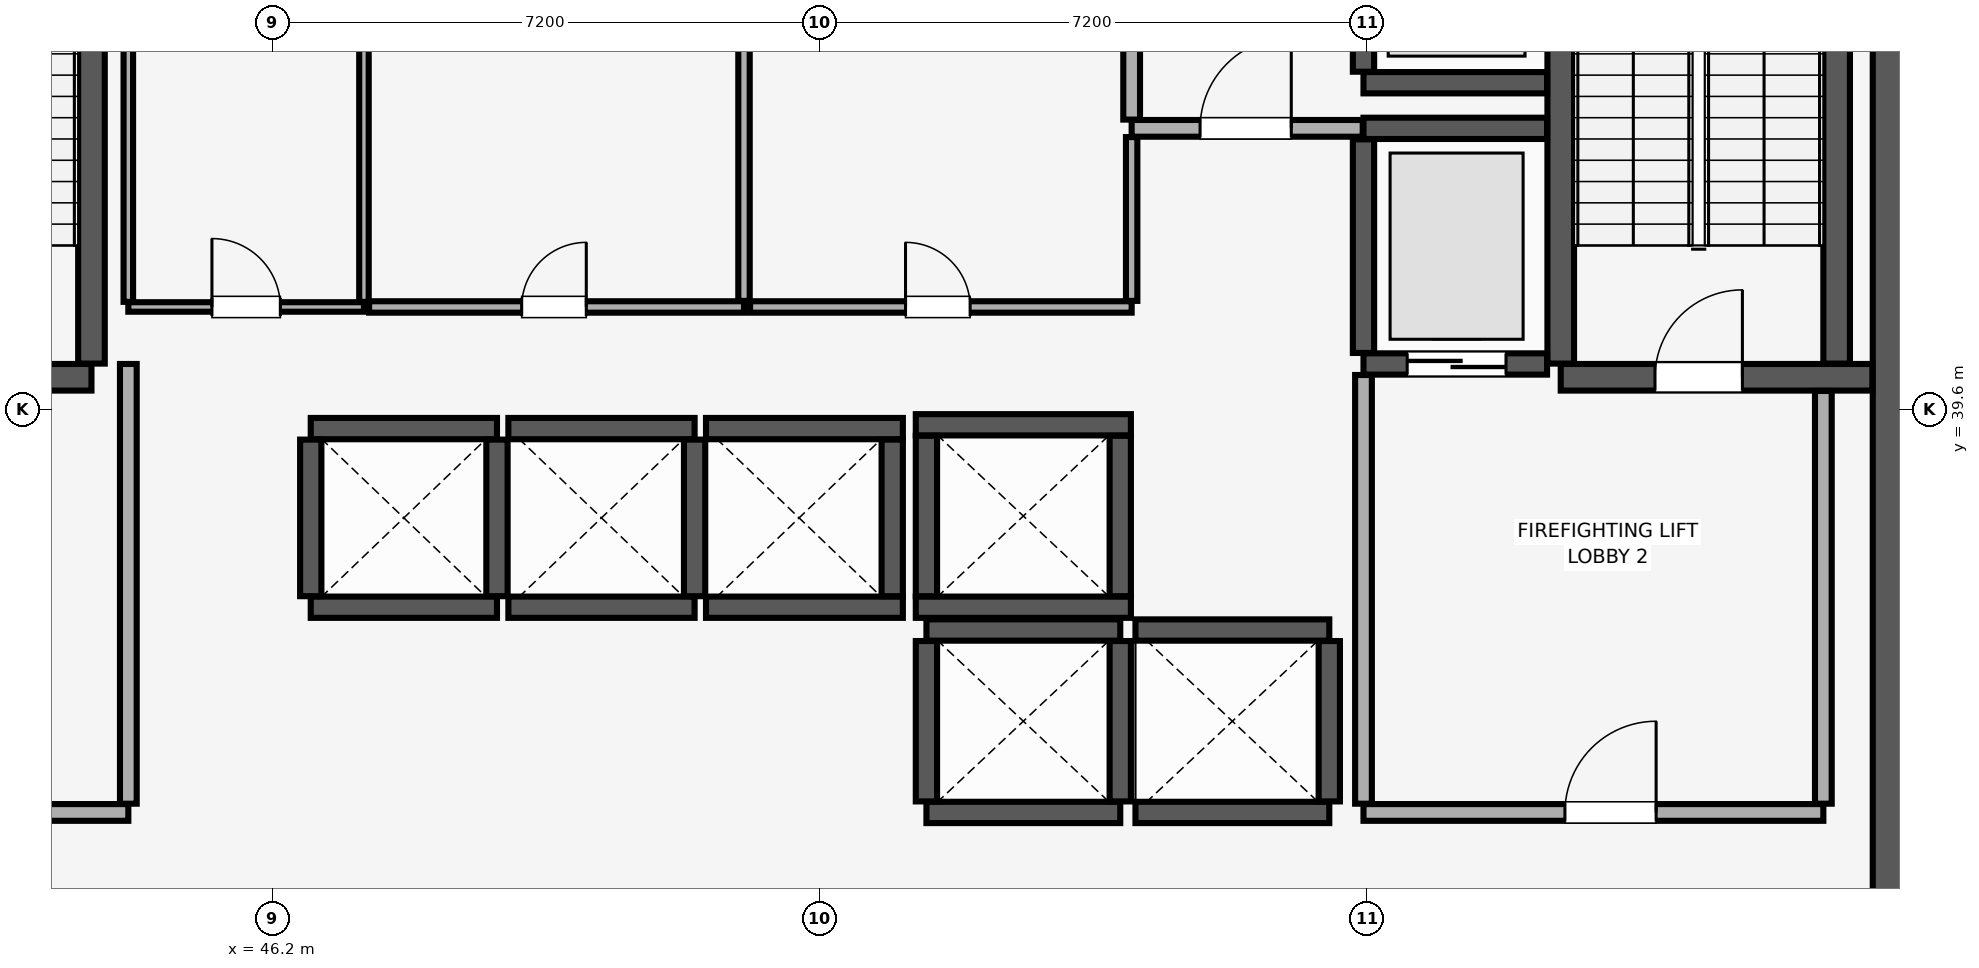
"""IFC4 building model, lengths in metres.
Left out: names, types, materials, properties, quantities, classifications, styles, units other than length and angle.
Written with IfcOpenShell. Run it as: python <this file> out.ifc"""

import sys

from ifc_helpers import new_model, si_unit, direction, frame, frame_2d, origin, place, context, subcontext, project, spatial, rectangle, extrude, element, fill, save


model = new_model("IFC4")
c1 = context("Model", 3, precision=1e-05, world=origin(), true_north=direction((0.0, 1.0)))
c2 = subcontext(c1, "Body", "Model", "MODEL_VIEW")
j1 = project(units=[si_unit("LENGTHUNIT", "METRE"), si_unit("PLANEANGLEUNIT", "RADIAN")], contexts=[c1])
p1 = place(None, origin())
s1 = spatial("IfcSite", under=j1, at=p1, CompositionType="ELEMENT")
p2 = place(p1, origin())
s2 = spatial("IfcBuilding", under=s1, at=p2, CompositionType="ELEMENT")
p3 = place(p2, frame((0.0, 0.0, 35.15)))
s3 = spatial("IfcBuildingStorey", under=s2, at=p3, CompositionType="ELEMENT", Elevation=35.15)
p4 = place(p3, frame((67.8, 29.4, 0.0), z_axis=(0.0, 0.0, 1.0), x_axis=(0.0, 1.0, 0.0)))
e1 = element("IfcWall", 1, at=p4, inside=s3, PredefinedType="SHEAR", context=c2, shape_type="SweptSolid", body=[
    extrude(rectangle(XDim=19.2, YDim=1.1, at=frame_2d((9.6, 0.0))), origin(), (0.0, 0.0, 1.0), 3.51),
])
p5 = place(p3, frame((40.185, 40.025, 0.0), z_axis=(0.0, 0.0, 1.0), x_axis=(1.0, 0.0, 0.0)))
e2 = element("IfcWall", 2, at=p5, inside=s3, PredefinedType="SHEAR", context=c2, shape_type="SweptSolid", body=[
    extrude(rectangle(XDim=3.63, YDim=0.35, at=frame_2d((1.815, 0.0))), origin(), (0.0, 0.0, 1.0), 3.51),
])
p6 = place(p5, frame((1.24, 0.0, 0.0)))
e3 = element("IfcOpeningElement", 3, at=p6, cuts=e2, PredefinedType="OPENING", context=c2, shape_type="SweptSolid", body=[
    extrude(rectangle(XDim=1.15, YDim=2.15, at=frame_2d((0.575, 1.075))), frame((0.0, 0.185, 0.0), z_axis=(0.0, -1.0, 0.0), x_axis=(1.0, 0.0, 0.0)), (0.0, 0.0, 1.0), 0.37),
])
p7 = place(p3, frame((43.815, 40.205, 0.0), z_axis=(0.0, 0.0, 1.0), x_axis=(0.0, 1.0, 0.0)))
e4 = element("IfcWall", 4, at=p7, inside=s3, PredefinedType="SHEAR", context=c2, shape_type="SweptSolid", body=[
    extrude(rectangle(XDim=8.09, YDim=0.35, at=frame_2d((4.045, 0.0))), origin(), (0.0, 0.0, 1.0), 3.51),
])
p8 = place(p3, frame((63.145, 40.025, 0.0), z_axis=(0.0, 0.0, 1.0), x_axis=(1.0, 0.0, 0.0)))
e5 = element("IfcWall", 5, at=p8, inside=s3, PredefinedType="SHEAR", context=c2, shape_type="SweptSolid", body=[
    extrude(rectangle(XDim=4.1, YDim=0.35, at=frame_2d((2.05, 0.0))), origin(), (0.0, 0.0, 1.0), 3.51),
])
p9 = place(p8, frame((1.24, 0.0, 0.0)))
e6 = element("IfcOpeningElement", 6, at=p9, cuts=e5, PredefinedType="OPENING", context=c2, shape_type="SweptSolid", body=[
    extrude(rectangle(XDim=1.15, YDim=2.15, at=frame_2d((0.575, 1.075))), frame((0.0, 0.185, 0.0), z_axis=(0.0, -1.0, 0.0), x_axis=(1.0, 0.0, 0.0)), (0.0, 0.0, 1.0), 0.37),
])
for number, where, z_axis, x_axis in (
    (7, (63.145, 40.205, 0.0), (0.0, 0.0, 1.0), (0.0, 1.0, 0.0)),
    (8, (66.775, 40.205, 0.0), (0.0, 0.0, 1.0), (0.0, 1.0, 0.0)),
):
    element("IfcWall", number, at=place(p3, frame(where, z_axis=z_axis, x_axis=x_axis)), inside=s3, PredefinedType="SHEAR", context=c2, shape_type="SweptSolid", body=[
        extrude(rectangle(XDim=8.09, YDim=0.35, at=frame_2d((4.045, 0.0))), origin(), (0.0, 0.0, 1.0), 3.51),
    ])
for number, where, z_axis, x_axis in (
    (9, (46.7, 37.0, 0.0), (0.0, 0.0, 1.0), (1.0, 0.0, 0.0)),
    (10, (46.7, 39.35, 0.0), (0.0, 0.0, 1.0), (1.0, 0.0, 0.0)),
):
    element("IfcWall", number, at=place(p3, frame(where, z_axis=z_axis, x_axis=x_axis)), inside=s3, PredefinedType="SHEAR", context=c2, shape_type="SweptSolid", body=[
        extrude(rectangle(XDim=2.45, YDim=0.28, at=frame_2d((1.225, 0.0))), origin(), (0.0, 0.0, 1.0), 3.51),
    ])
for number, where, z_axis, x_axis in (
    (11, (46.7, 37.145, 0.0), (0.0, 0.0, 1.0), (0.0, 1.0, 0.0)),
    (12, (49.15, 37.145, 0.0), (0.0, 0.0, 1.0), (0.0, 1.0, 0.0)),
):
    element("IfcWall", number, at=place(p3, frame(where, z_axis=z_axis, x_axis=x_axis)), inside=s3, PredefinedType="SHEAR", context=c2, shape_type="SweptSolid", body=[
        extrude(rectangle(XDim=2.06, YDim=0.28, at=frame_2d((1.03, 0.0))), origin(), (0.0, 0.0, 1.0), 3.51),
    ])
for number, where, z_axis, x_axis in (
    (13, (49.3, 37.0, 0.0), (0.0, 0.0, 1.0), (1.0, 0.0, 0.0)),
    (14, (49.3, 39.35, 0.0), (0.0, 0.0, 1.0), (1.0, 0.0, 0.0)),
):
    element("IfcWall", number, at=place(p3, frame(where, z_axis=z_axis, x_axis=x_axis)), inside=s3, PredefinedType="SHEAR", context=c2, shape_type="SweptSolid", body=[
        extrude(rectangle(XDim=2.45, YDim=0.28, at=frame_2d((1.225, 0.0))), origin(), (0.0, 0.0, 1.0), 3.51),
    ])
p10 = place(p3, frame((51.75, 37.145, 0.0), z_axis=(0.0, 0.0, 1.0), x_axis=(0.0, 1.0, 0.0)))
e15 = element("IfcWall", 15, at=p10, inside=s3, PredefinedType="SHEAR", context=c2, shape_type="SweptSolid", body=[
    extrude(rectangle(XDim=2.06, YDim=0.28, at=frame_2d((1.03, 0.0))), origin(), (0.0, 0.0, 1.0), 3.51),
])
for number, where, z_axis, x_axis in (
    (16, (51.9, 37.0, 0.0), (0.0, 0.0, 1.0), (1.0, 0.0, 0.0)),
    (17, (51.9, 39.35, 0.0), (0.0, 0.0, 1.0), (1.0, 0.0, 0.0)),
):
    element("IfcWall", number, at=place(p3, frame(where, z_axis=z_axis, x_axis=x_axis)), inside=s3, PredefinedType="SHEAR", context=c2, shape_type="SweptSolid", body=[
        extrude(rectangle(XDim=2.59, YDim=0.28, at=frame_2d((1.295, 0.0))), origin(), (0.0, 0.0, 1.0), 3.51),
    ])
p11 = place(p3, frame((54.35, 37.145, 0.0), z_axis=(0.0, 0.0, 1.0), x_axis=(0.0, 1.0, 0.0)))
e18 = element("IfcWall", 18, at=p11, inside=s3, PredefinedType="SHEAR", context=c2, shape_type="SweptSolid", body=[
    extrude(rectangle(XDim=2.06, YDim=0.28, at=frame_2d((1.03, 0.0))), origin(), (0.0, 0.0, 1.0), 3.51),
])
for number, where, z_axis, x_axis in (
    (19, (54.8, 34.3, 0.0), (0.0, 0.0, 1.0), (1.0, 0.0, 0.0)),
    (20, (54.8, 36.7, 0.0), (0.0, 0.0, 1.0), (1.0, 0.0, 0.0)),
):
    element("IfcWall", number, at=place(p3, frame(where, z_axis=z_axis, x_axis=x_axis)), inside=s3, PredefinedType="SHEAR", context=c2, shape_type="SweptSolid", body=[
        extrude(rectangle(XDim=2.55, YDim=0.28, at=frame_2d((1.275, 0.0))), origin(), (0.0, 0.0, 1.0), 3.51),
    ])
for number, where, z_axis, x_axis in (
    (21, (54.8, 34.445, 0.0), (0.0, 0.0, 1.0), (0.0, 1.0, 0.0)),
    (22, (57.35, 34.445, 0.0), (0.0, 0.0, 1.0), (0.0, 1.0, 0.0)),
):
    element("IfcWall", number, at=place(p3, frame(where, z_axis=z_axis, x_axis=x_axis)), inside=s3, PredefinedType="SHEAR", context=c2, shape_type="SweptSolid", body=[
        extrude(rectangle(XDim=2.11, YDim=0.28, at=frame_2d((1.055, 0.0))), origin(), (0.0, 0.0, 1.0), 3.51),
    ])
for number, where, z_axis, x_axis in (
    (23, (57.55, 34.3, 0.0), (0.0, 0.0, 1.0), (1.0, 0.0, 0.0)),
    (24, (57.55, 36.7, 0.0), (0.0, 0.0, 1.0), (1.0, 0.0, 0.0)),
):
    element("IfcWall", number, at=place(p3, frame(where, z_axis=z_axis, x_axis=x_axis)), inside=s3, PredefinedType="SHEAR", context=c2, shape_type="SweptSolid", body=[
        extrude(rectangle(XDim=2.55, YDim=0.28, at=frame_2d((1.275, 0.0))), origin(), (0.0, 0.0, 1.0), 3.51),
    ])
p12 = place(p3, frame((60.1, 34.445, 0.0), z_axis=(0.0, 0.0, 1.0), x_axis=(0.0, 1.0, 0.0)))
e25 = element("IfcWall", 25, at=p12, inside=s3, PredefinedType="SHEAR", context=c2, shape_type="SweptSolid", body=[
    extrude(rectangle(XDim=2.11, YDim=0.28, at=frame_2d((1.055, 0.0))), origin(), (0.0, 0.0, 1.0), 3.51),
])
for number, where, z_axis, x_axis in (
    (26, (54.66, 37.0, 0.0), (0.0, 0.0, 1.0), (1.0, 0.0, 0.0)),
    (27, (54.66, 39.4, 0.0), (0.0, 0.0, 1.0), (1.0, 0.0, 0.0)),
):
    element("IfcWall", number, at=place(p3, frame(where, z_axis=z_axis, x_axis=x_axis)), inside=s3, PredefinedType="SHEAR", context=c2, shape_type="SweptSolid", body=[
        extrude(rectangle(XDim=2.83, YDim=0.28, at=frame_2d((1.415, 0.0))), origin(), (0.0, 0.0, 1.0), 3.51),
    ])
for number, where, z_axis, x_axis in (
    (28, (54.8, 37.145, 0.0), (0.0, 0.0, 1.0), (0.0, 1.0, 0.0)),
    (29, (57.35, 37.145, 0.0), (0.0, 0.0, 1.0), (0.0, 1.0, 0.0)),
):
    element("IfcWall", number, at=place(p3, frame(where, z_axis=z_axis, x_axis=x_axis)), inside=s3, PredefinedType="SHEAR", context=c2, shape_type="SweptSolid", body=[
        extrude(rectangle(XDim=2.11, YDim=0.28, at=frame_2d((1.055, 0.0))), origin(), (0.0, 0.0, 1.0), 3.51),
    ])
p13 = place(p3, frame((60.55, 40.2, 0.0), z_axis=(0.0, 0.0, 1.0), x_axis=(1.0, 0.0, 0.0)))
e30 = element("IfcWall", 30, at=p13, inside=s3, PredefinedType="SHEAR", context=c2, shape_type="SweptSolid", body=[
    extrude(rectangle(XDim=2.415, YDim=0.28, at=frame_2d((1.208, 0.0))), origin(), (0.0, 0.0, 1.0), 3.51),
])
p14 = place(p13, frame((0.575, 0.0, 0.0)))
e31 = element("IfcOpeningElement", 31, at=p14, cuts=e30, PredefinedType="OPENING", context=c2, shape_type="SweptSolid", body=[
    extrude(rectangle(XDim=1.3, YDim=2.3, at=frame_2d((0.65, 1.15))), frame((0.0, 0.15, 0.0), z_axis=(0.0, -1.0, 0.0), x_axis=(1.0, 0.0, 0.0)), (0.0, 0.0, 1.0), 0.3),
])
p15 = place(p3, frame((60.55, 43.3, 0.0), z_axis=(0.0, 0.0, 1.0), x_axis=(1.0, 0.0, 0.0)))
e32 = element("IfcWall", 32, at=p15, inside=s3, PredefinedType="SHEAR", context=c2, shape_type="SweptSolid", body=[
    extrude(rectangle(XDim=2.415, YDim=0.28, at=frame_2d((1.208, 0.0))), origin(), (0.0, 0.0, 1.0), 3.51),
])
p16 = place(p3, frame((60.55, 40.345, 0.0), z_axis=(0.0, 0.0, 1.0), x_axis=(0.0, 1.0, 0.0)))
e33 = element("IfcWall", 33, at=p16, inside=s3, PredefinedType="SHEAR", context=c2, shape_type="SweptSolid", body=[
    extrude(rectangle(XDim=2.81, YDim=0.28, at=frame_2d((1.405, 0.0))), origin(), (0.0, 0.0, 1.0), 3.51),
])
p17 = place(p3, frame((60.55, 43.9, 0.0), z_axis=(0.0, 0.0, 1.0), x_axis=(1.0, 0.0, 0.0)))
e34 = element("IfcWall", 34, at=p17, inside=s3, PredefinedType="SHEAR", context=c2, shape_type="SweptSolid", body=[
    extrude(rectangle(XDim=2.415, YDim=0.28, at=frame_2d((1.208, 0.0))), origin(), (0.0, 0.0, 1.0), 3.51),
])
p18 = place(p3, frame((60.55, 44.045, 0.0), z_axis=(0.0, 0.0, 1.0), x_axis=(0.0, 1.0, 0.0)))
e35 = element("IfcWall", 35, at=p18, inside=s3, PredefinedType="SHEAR", context=c2, shape_type="SweptSolid", body=[
    extrude(rectangle(XDim=3.11, YDim=0.28, at=frame_2d((1.555, 0.0))), origin(), (0.0, 0.0, 1.0), 3.51),
])
p19 = place(p18, frame((0.905, 0.0, 0.0)))
e36 = element("IfcOpeningElement", 36, at=p19, cuts=e35, PredefinedType="OPENING", context=c2, shape_type="SweptSolid", body=[
    extrude(rectangle(XDim=1.3, YDim=2.3, at=frame_2d((0.65, 1.15))), frame((0.0, 0.15, 0.0), z_axis=(0.0, -1.0, 0.0), x_axis=(1.0, 0.0, 0.0)), (0.0, 0.0, 1.0), 0.3),
])
p20 = place(p3, frame((60.55, 34.3, 0.0), z_axis=(0.0, 0.0, 1.0), x_axis=(1.0, 0.0, 0.0)))
e37 = element("IfcWall", 37, at=p20, inside=s3, PredefinedType="PARTITIONING", context=c2, shape_type="SweptSolid", body=[
    extrude(rectangle(XDim=6.05, YDim=0.22, at=frame_2d((3.025, 0.0))), origin(), (0.0, 0.0, 1.0), 3.51),
])
p21 = place(p20, frame((2.65, 0.0, 0.0)))
e38 = element("IfcOpeningElement", 38, at=p21, cuts=e37, PredefinedType="OPENING", context=c2, shape_type="SweptSolid", body=[
    extrude(rectangle(XDim=1.2, YDim=2.15, at=frame_2d((0.6, 1.075))), frame((0.0, 0.12, 0.0), z_axis=(0.0, -1.0, 0.0), x_axis=(1.0, 0.0, 0.0)), (0.0, 0.0, 1.0), 0.24),
])
p22 = place(p3, frame((60.55, 34.415, 0.0), z_axis=(0.0, 0.0, 1.0), x_axis=(0.0, 1.0, 0.0)))
e39 = element("IfcWall", 39, at=p22, inside=s3, PredefinedType="PARTITIONING", context=c2, shape_type="SweptSolid", body=[
    extrude(rectangle(XDim=5.64, YDim=0.22, at=frame_2d((2.82, 0.0))), origin(), (0.0, 0.0, 1.0), 3.51),
])
p23 = place(p3, frame((66.6, 34.415, 0.0), z_axis=(0.0, 0.0, 1.0), x_axis=(0.0, 1.0, 0.0)))
e40 = element("IfcWall", 40, at=p23, inside=s3, PredefinedType="PARTITIONING", context=c2, shape_type="SweptSolid", body=[
    extrude(rectangle(XDim=5.43, YDim=0.22, at=frame_2d((2.715, 0.0))), origin(), (0.0, 0.0, 1.0), 3.51),
])
p24 = place(p3, frame((39.7, 34.3, 0.0), z_axis=(0.0, 0.0, 1.0), x_axis=(1.0, 0.0, 0.0)))
e41 = element("IfcWall", 41, at=p24, inside=s3, PredefinedType="PARTITIONING", context=c2, shape_type="SweptSolid", body=[
    extrude(rectangle(XDim=4.6, YDim=0.22, at=frame_2d((2.3, 0.0))), origin(), (0.0, 0.0, 1.0), 3.51),
])
p25 = place(p24, frame((1.7, 0.0, 0.0)))
e42 = element("IfcOpeningElement", 42, at=p25, cuts=e41, PredefinedType="OPENING", context=c2, shape_type="SweptSolid", body=[
    extrude(rectangle(XDim=1.2, YDim=2.15, at=frame_2d((0.6, 1.075))), frame((0.0, 0.12, 0.0), z_axis=(0.0, -1.0, 0.0), x_axis=(1.0, 0.0, 0.0)), (0.0, 0.0, 1.0), 0.24),
])
p26 = place(p3, frame((44.3, 34.415, 0.0), z_axis=(0.0, 0.0, 1.0), x_axis=(0.0, 1.0, 0.0)))
e43 = element("IfcWall", 43, at=p26, inside=s3, PredefinedType="PARTITIONING", context=c2, shape_type="SweptSolid", body=[
    extrude(rectangle(XDim=5.785, YDim=0.22, at=frame_2d((2.893, 0.0))), origin(), (0.0, 0.0, 1.0), 3.51),
])
p27 = place(p3, frame((57.5, 43.3, 0.0), z_axis=(0.0, 0.0, 1.0), x_axis=(1.0, 0.0, 0.0)))
e44 = element("IfcWall", 44, at=p27, inside=s3, PredefinedType="PARTITIONING", context=c2, shape_type="SweptSolid", body=[
    extrude(rectangle(XDim=3.04, YDim=0.22, at=frame_2d((1.52, 0.0))), origin(), (0.0, 0.0, 1.0), 3.51),
])
p28 = place(p27, frame((0.9, 0.0, 0.0)))
e45 = element("IfcOpeningElement", 45, at=p28, cuts=e44, PredefinedType="OPENING", context=c2, shape_type="SweptSolid", body=[
    extrude(rectangle(XDim=1.2, YDim=2.15, at=frame_2d((0.6, 1.075))), frame((0.0, 0.12, 0.0), z_axis=(0.0, -1.0, 0.0), x_axis=(1.0, 0.0, 0.0)), (0.0, 0.0, 1.0), 0.24),
])
p29 = place(p3, frame((57.5, 43.415, 0.0), z_axis=(0.0, 0.0, 1.0), x_axis=(0.0, 1.0, 0.0)))
e46 = element("IfcWall", 46, at=p29, inside=s3, PredefinedType="PARTITIONING", context=c2, shape_type="SweptSolid", body=[
    extrude(rectangle(XDim=5.435, YDim=0.22, at=frame_2d((2.718, 0.0))), origin(), (0.0, 0.0, 1.0), 3.51),
])
p30 = place(p3, frame((44.3, 40.95, 0.0), z_axis=(0.0, 0.0, 1.0), x_axis=(1.0, 0.0, 0.0)))
e47 = element("IfcWall", 47, at=p30, inside=s3, PredefinedType="PARTITIONING", context=c2, shape_type="SweptSolid", body=[
    extrude(rectangle(XDim=3.1, YDim=0.125, at=frame_2d((1.55, 0.0))), origin(), (0.0, 0.0, 1.0), 3.51),
])
p31 = place(p30, frame((1.1, 0.0, 0.0)))
e48 = element("IfcOpeningElement", 48, at=p31, cuts=e47, PredefinedType="OPENING", context=c2, shape_type="SweptSolid", body=[
    extrude(rectangle(XDim=0.9, YDim=2.1, at=frame_2d((0.45, 1.05))), frame((0.0, 0.073, 0.0), z_axis=(0.0, -1.0, 0.0), x_axis=(1.0, 0.0, 0.0)), (0.0, 0.0, 1.0), 0.145),
])
for number, where, z_axis, x_axis in (
    (49, (44.3, 41.018, 0.0), (0.0, 0.0, 1.0), (0.0, 1.0, 0.0)),
    (50, (47.4, 41.018, 0.0), (0.0, 0.0, 1.0), (0.0, 1.0, 0.0)),
):
    element("IfcWall", number, at=place(p3, frame(where, z_axis=z_axis, x_axis=x_axis)), inside=s3, PredefinedType="PARTITIONING", context=c2, shape_type="SweptSolid", body=[
        extrude(rectangle(XDim=7.833, YDim=0.125, at=frame_2d((3.916, 0.0))), origin(), (0.0, 0.0, 1.0), 3.51),
    ])
p32 = place(p3, frame((47.468, 40.95, 0.0), z_axis=(0.0, 0.0, 1.0), x_axis=(1.0, 0.0, 0.0)))
e51 = element("IfcWall", 51, at=p32, inside=s3, PredefinedType="PARTITIONING", context=c2, shape_type="SweptSolid", body=[
    extrude(rectangle(XDim=4.932, YDim=0.15, at=frame_2d((2.466, 0.0))), origin(), (0.0, 0.0, 1.0), 3.51),
])
p33 = place(p32, frame((2.008, 0.0, 0.0)))
e52 = element("IfcOpeningElement", 52, at=p33, cuts=e51, PredefinedType="OPENING", context=c2, shape_type="SweptSolid", body=[
    extrude(rectangle(XDim=0.85, YDim=2.1, at=frame_2d((0.425, 1.05))), frame((0.0, 0.085, 0.0), z_axis=(0.0, -1.0, 0.0), x_axis=(1.0, 0.0, 0.0)), (0.0, 0.0, 1.0), 0.17),
])
p34 = place(p3, frame((52.4, 41.03, 0.0), z_axis=(0.0, 0.0, 1.0), x_axis=(0.0, 1.0, 0.0)))
e53 = element("IfcWall", 53, at=p34, inside=s3, PredefinedType="PARTITIONING", context=c2, shape_type="SweptSolid", body=[
    extrude(rectangle(XDim=7.82, YDim=0.15, at=frame_2d((3.91, 0.0))), origin(), (0.0, 0.0, 1.0), 3.51),
])
p35 = place(p3, frame((52.48, 40.95, 0.0), z_axis=(0.0, 0.0, 1.0), x_axis=(1.0, 0.0, 0.0)))
e54 = element("IfcWall", 54, at=p35, inside=s3, PredefinedType="PARTITIONING", context=c2, shape_type="SweptSolid", body=[
    extrude(rectangle(XDim=5.02, YDim=0.15, at=frame_2d((2.51, 0.0))), origin(), (0.0, 0.0, 1.0), 3.51),
])
p36 = place(p35, frame((2.045, 0.0, 0.0)))
e55 = element("IfcOpeningElement", 55, at=p36, cuts=e54, PredefinedType="OPENING", context=c2, shape_type="SweptSolid", body=[
    extrude(rectangle(XDim=0.85, YDim=2.1, at=frame_2d((0.425, 1.05))), frame((0.0, 0.085, 0.0), z_axis=(0.0, -1.0, 0.0), x_axis=(1.0, 0.0, 0.0)), (0.0, 0.0, 1.0), 0.17),
])
p37 = place(p3, frame((57.5, 41.03, 0.0), z_axis=(0.0, 0.0, 1.0), x_axis=(0.0, 1.0, 0.0)))
e56 = element("IfcWall", 56, at=p37, inside=s3, PredefinedType="PARTITIONING", context=c2, shape_type="SweptSolid", body=[
    extrude(rectangle(XDim=2.155, YDim=0.15, at=frame_2d((1.078, 0.0))), origin(), (0.0, 0.0, 1.0), 3.51),
])
p38 = place(p9, origin())
e57 = element("IfcDoor", 57, at=p38, inside=s3, OperationType="SINGLE_SWING_RIGHT", PredefinedType="DOOR", context=c2, shape_type="SweptSolid", body=[
    extrude(rectangle(XDim=1.15, YDim=2.15, at=frame_2d((0.575, 1.075))), frame((0.0, 0.025, 0.0), z_axis=(0.0, -1.0, 0.0), x_axis=(1.0, 0.0, 0.0)), (0.0, 0.0, 1.0), 0.05),
])
fill(e6, e57)
p39 = place(p14, origin())
e58 = element("IfcDoor", 58, at=p39, inside=s3, OperationType="DOUBLE_DOOR_SLIDING", PredefinedType="DOOR", context=c2, shape_type="SweptSolid", body=[
    extrude(rectangle(XDim=1.3, YDim=2.3, at=frame_2d((0.65, 1.15))), frame((0.0, 0.025, 0.0), z_axis=(0.0, -1.0, 0.0), x_axis=(1.0, 0.0, 0.0)), (0.0, 0.0, 1.0), 0.05),
])
fill(e31, e58)
p40 = place(p21, origin())
e59 = element("IfcDoor", 59, at=p40, inside=s3, OperationType="SINGLE_SWING_RIGHT", PredefinedType="DOOR", context=c2, shape_type="SweptSolid", body=[
    extrude(rectangle(XDim=1.2, YDim=2.15, at=frame_2d((0.6, 1.075))), frame((0.0, 0.025, 0.0), z_axis=(0.0, -1.0, 0.0), x_axis=(1.0, 0.0, 0.0)), (0.0, 0.0, 1.0), 0.05),
])
fill(e38, e59)
p41 = place(p28, origin())
e60 = element("IfcDoor", 60, at=p41, inside=s3, OperationType="SINGLE_SWING_RIGHT", PredefinedType="DOOR", context=c2, shape_type="SweptSolid", body=[
    extrude(rectangle(XDim=1.2, YDim=2.15, at=frame_2d((0.6, 1.075))), frame((0.0, 0.025, 0.0), z_axis=(0.0, -1.0, 0.0), x_axis=(1.0, 0.0, 0.0)), (0.0, 0.0, 1.0), 0.05),
])
fill(e45, e60)
p42 = place(p31, origin())
e61 = element("IfcDoor", 61, at=p42, inside=s3, OperationType="SINGLE_SWING_LEFT", PredefinedType="DOOR", context=c2, shape_type="SweptSolid", body=[
    extrude(rectangle(XDim=0.9, YDim=2.1, at=frame_2d((0.45, 1.05))), frame((0.0, 0.025, 0.0), z_axis=(0.0, -1.0, 0.0), x_axis=(1.0, 0.0, 0.0)), (0.0, 0.0, 1.0), 0.05),
])
fill(e48, e61)
p43 = place(p33, origin())
e62 = element("IfcDoor", 62, at=p43, inside=s3, OperationType="SINGLE_SWING_RIGHT", PredefinedType="DOOR", context=c2, shape_type="SweptSolid", body=[
    extrude(rectangle(XDim=0.85, YDim=2.1, at=frame_2d((0.425, 1.05))), frame((0.0, 0.025, 0.0), z_axis=(0.0, -1.0, 0.0), x_axis=(1.0, 0.0, 0.0)), (0.0, 0.0, 1.0), 0.05),
])
fill(e52, e62)
p44 = place(p36, origin())
e63 = element("IfcDoor", 63, at=p44, inside=s3, OperationType="SINGLE_SWING_LEFT", PredefinedType="DOOR", context=c2, shape_type="SweptSolid", body=[
    extrude(rectangle(XDim=0.85, YDim=2.1, at=frame_2d((0.425, 1.05))), frame((0.0, 0.025, 0.0), z_axis=(0.0, -1.0, 0.0), x_axis=(1.0, 0.0, 0.0)), (0.0, 0.0, 1.0), 0.05),
])
fill(e55, e63)
save(model, sys.argv[1])
